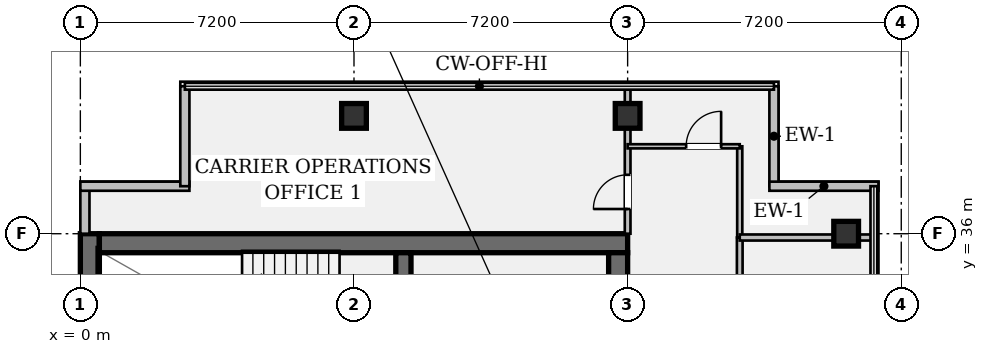
"""IFC4 building model, lengths in metres.
Left out: names, types, materials, properties, quantities, classifications, styles, units other than length and angle.
Written with IfcOpenShell. Run it as: python <this file> out.ifc"""

import sys

from ifc_helpers import new_model, si_unit, direction, frame, frame_2d, origin, origin_2d, place, context, subcontext, project, spatial, rectangle, hollow_rectangle, extrude, element, fill, save


model = new_model("IFC4")
c1 = context("Model", 3, precision=1e-05, world=origin(), true_north=direction((0.0, 1.0)))
c2 = subcontext(c1, "Body", "Model", "MODEL_VIEW")
j1 = project(units=[si_unit("LENGTHUNIT", "METRE"), si_unit("PLANEANGLEUNIT", "RADIAN")], contexts=[c1])
p1 = place(None, origin())
s1 = spatial("IfcSite", under=j1, at=p1, CompositionType="ELEMENT")
p2 = place(p1, origin())
s2 = spatial("IfcBuilding", under=s1, at=p2, CompositionType="ELEMENT")
p3 = place(p2, frame((0.0, 0.0, 272.65)))
s3 = spatial("IfcBuildingStorey", under=s2, at=p3, CompositionType="ELEMENT", Elevation=272.65)
p4 = place(p3, frame((0.25, 7.2, 0.0), z_axis=(0.0, 0.0, 1.0), x_axis=(0.0, 1.0, 0.0)))
e1 = element("IfcWall", 1, at=p4, inside=s3, PredefinedType="SHEAR", context=c2, shape_type="SweptSolid", body=[
    extrude(rectangle(XDim=28.8, YDim=0.5, at=frame_2d((14.4, 0.0))), origin(), (0.0, 0.0, 1.0), 3.24),
])
p5 = place(p3, frame((0.5, 35.75, 0.0), z_axis=(0.0, 0.0, 1.0), x_axis=(1.0, 0.0, 0.0)))
e2 = element("IfcWall", 2, at=p5, inside=s3, PredefinedType="SHEAR", context=c2, shape_type="SweptSolid", body=[
    extrude(rectangle(XDim=13.9, YDim=0.5, at=frame_2d((6.95, 0.0))), origin(), (0.0, 0.0, 1.0), 3.24),
])
p6 = place(p3, frame((14.15, 35.5, 0.0), z_axis=(0.0, 0.0, 1.0), x_axis=(0.0, -1.0, 0.0)))
e3 = element("IfcWall", 3, at=p6, inside=s3, PredefinedType="SHEAR", context=c2, shape_type="SweptSolid", body=[
    extrude(rectangle(XDim=27.8, YDim=0.5, at=frame_2d((13.9, 0.0))), origin(), (0.0, 0.0, 1.0), 3.24),
])
p7 = place(p6, frame((1.4, 0.0, 0.0)))
e4 = element("IfcOpeningElement", 4, at=p7, cuts=e3, PredefinedType="OPENING", context=c2, shape_type="SweptSolid", body=[
    extrude(rectangle(XDim=1.2, YDim=2.15, at=frame_2d((0.6, 1.075))), frame((0.0, 0.262, 0.0), z_axis=(0.0, -1.0, 0.0), x_axis=(1.0, 0.0, 0.0)), (0.0, 0.0, 1.0), 0.524),
])
p8 = place(p6, frame((25.35, 0.0, 0.0)))
e5 = element("IfcOpeningElement", 5, at=p8, cuts=e3, PredefinedType="OPENING", context=c2, shape_type="SweptSolid", body=[
    extrude(rectangle(XDim=1.2, YDim=2.15, at=frame_2d((0.6, 1.075))), frame((0.0, 0.262, 0.0), z_axis=(0.0, -1.0, 0.0), x_axis=(1.0, 0.0, 0.0)), (0.0, 0.0, 1.0), 0.524),
])
p9 = place(p6, frame((14.7, 0.0, 0.0)))
e6 = element("IfcOpeningElement", 6, at=p9, cuts=e3, PredefinedType="OPENING", context=c2, shape_type="SweptSolid", body=[
    extrude(rectangle(XDim=1.6, YDim=2.2, at=frame_2d((0.8, 1.1))), frame((0.0, 0.262, 0.0), z_axis=(0.0, -1.0, 0.0), x_axis=(1.0, 0.0, 0.0)), (0.0, 0.0, 1.0), 0.524),
])
p10 = place(p3, frame((8.5, 31.72, 0.0), z_axis=(0.0, 0.0, 1.0), x_axis=(0.0, 1.0, 0.0)))
e7 = element("IfcWall", 7, at=p10, inside=s3, PredefinedType="SHEAR", context=c2, shape_type="SweptSolid", body=[
    extrude(rectangle(XDim=3.78, YDim=0.4, at=frame_2d((1.89, 0.0))), origin(), (0.0, 0.0, 1.0), 3.24),
])
p11 = place(p10, frame((0.9, 0.0, 0.0)))
e8 = element("IfcOpeningElement", 8, at=p11, cuts=e7, PredefinedType="OPENING", context=c2, shape_type="SweptSolid", body=[
    extrude(rectangle(XDim=1.1, YDim=2.15, at=frame_2d((0.55, 1.075))), frame((0.0, 0.212, 0.0), z_axis=(0.0, -1.0, 0.0), x_axis=(1.0, 0.0, 0.0)), (0.0, 0.0, 1.0), 0.424),
])
for number, where, z_axis, x_axis in (
    (9, (7.2, 39.1, 0.0), (0.0, 0.0, 1.0), (1.0, 0.0, 0.0)),
    (10, (14.4, 39.1, 0.0), (0.0, 0.0, 1.0), (1.0, 0.0, 0.0)),
    (11, (20.15, 36.0, 0.0), (0.0, 0.0, 1.0), (1.0, 0.0, 0.0)),
):
    element("IfcColumn", number, at=place(p3, frame(where, z_axis=z_axis, x_axis=x_axis)), inside=s3, PredefinedType="COLUMN", context=c2, shape_type="SweptSolid", body=[
        extrude(hollow_rectangle(XDim=0.65, YDim=0.65, WallThickness=0.04, at=origin_2d()), origin(), (0.0, 0.0, 1.0), 3.24),
    ])
p12 = place(p3, frame((0.12, 36.0, 0.0), z_axis=(0.0, 0.0, 1.0), x_axis=(0.0, 1.0, 0.0)))
e12 = element("IfcWall", 12, at=p12, inside=s3, PredefinedType="STANDARD", context=c2, shape_type="SweptSolid", body=[
    extrude(rectangle(XDim=1.25, YDim=0.24, at=frame_2d((0.625, 0.0))), origin(), (0.0, 0.0, 1.0), 3.24),
])
p13 = place(p3, frame((0.0, 37.25, 0.0), z_axis=(0.0, 0.0, 1.0), x_axis=(1.0, 0.0, 0.0)))
e13 = element("IfcWall", 13, at=p13, inside=s3, PredefinedType="STANDARD", context=c2, shape_type="SweptSolid", body=[
    extrude(rectangle(XDim=2.87, YDim=0.24, at=frame_2d((1.435, 0.0))), origin(), (0.0, 0.0, 1.0), 3.24),
])
for number, where, z_axis, x_axis in (
    (14, (2.75, 37.25, 0.0), (0.0, 0.0, 1.0), (0.0, 1.0, 0.0)),
    (15, (18.25, 39.88, 0.0), (0.0, 0.0, 1.0), (0.0, -1.0, 0.0)),
):
    element("IfcWall", number, at=place(p3, frame(where, z_axis=z_axis, x_axis=x_axis)), inside=s3, PredefinedType="STANDARD", context=c2, shape_type="SweptSolid", body=[
        extrude(rectangle(XDim=2.63, YDim=0.24, at=frame_2d((1.315, 0.0))), origin(), (0.0, 0.0, 1.0), 3.24),
    ])
p14 = place(p3, frame((18.13, 37.25, 0.0), z_axis=(0.0, 0.0, 1.0), x_axis=(1.0, 0.0, 0.0)))
e16 = element("IfcWall", 16, at=p14, inside=s3, PredefinedType="STANDARD", context=c2, shape_type="SweptSolid", body=[
    extrude(rectangle(XDim=2.87, YDim=0.24, at=frame_2d((1.435, 0.0))), origin(), (0.0, 0.0, 1.0), 3.24),
])
p15 = place(p3, frame((17.35, 13.15, 0.0), z_axis=(0.0, 0.0, 1.0), x_axis=(0.0, 1.0, 0.0)))
e17 = element("IfcWall", 17, at=p15, inside=s3, PredefinedType="PARTITIONING", context=c2, shape_type="SweptSolid", body=[
    extrude(rectangle(XDim=22.75, YDim=0.15, at=frame_2d((11.375, 0.0))), origin(), (0.0, 0.0, 1.0), 2.676),
])
p16 = place(p15, frame((4.3, 0.0, 0.0)))
e18 = element("IfcOpeningElement", 18, at=p16, cuts=e17, PredefinedType="OPENING", context=c2, shape_type="SweptSolid", body=[
    extrude(rectangle(XDim=0.92, YDim=2.15, at=frame_2d((0.46, 1.075))), frame((0.0, 0.087, 0.0), z_axis=(0.0, -1.0, 0.0), x_axis=(1.0, 0.0, 0.0)), (0.0, 0.0, 1.0), 0.174),
])
p17 = place(p15, frame((8.4, 0.0, 0.0)))
e19 = element("IfcOpeningElement", 19, at=p17, cuts=e17, PredefinedType="OPENING", context=c2, shape_type="SweptSolid", body=[
    extrude(rectangle(XDim=1.0, YDim=2.15, at=frame_2d((0.5, 1.075))), frame((0.0, 0.087, 0.0), z_axis=(0.0, -1.0, 0.0), x_axis=(1.0, 0.0, 0.0)), (0.0, 0.0, 1.0), 0.174),
])
p18 = place(p3, frame((14.4, 36.0, 0.0), z_axis=(0.0, 0.0, 1.0), x_axis=(0.0, 1.0, 0.0)))
e20 = element("IfcWall", 20, at=p18, inside=s3, PredefinedType="PARTITIONING", context=c2, shape_type="SweptSolid", body=[
    extrude(rectangle(XDim=3.88, YDim=0.15, at=frame_2d((1.94, 0.0))), origin(), (0.0, 0.0, 1.0), 2.676),
])
p19 = place(p18, frame((0.65, 0.0, 0.0)))
e21 = element("IfcOpeningElement", 21, at=p19, cuts=e20, PredefinedType="OPENING", context=c2, shape_type="SweptSolid", body=[
    extrude(rectangle(XDim=0.9, YDim=2.15, at=frame_2d((0.45, 1.075))), frame((0.0, 0.087, 0.0), z_axis=(0.0, -1.0, 0.0), x_axis=(1.0, 0.0, 0.0)), (0.0, 0.0, 1.0), 0.174),
])
p20 = place(p3, frame((17.35, 35.9, 0.0), z_axis=(0.0, 0.0, 1.0), x_axis=(0.0, 1.0, 0.0)))
e22 = element("IfcWall", 22, at=p20, inside=s3, PredefinedType="PARTITIONING", context=c2, shape_type="SweptSolid", body=[
    extrude(rectangle(XDim=2.4, YDim=0.135, at=frame_2d((1.2, 0.0))), origin(), (0.0, 0.0, 1.0), 2.676),
])
p21 = place(p3, frame((14.4, 38.3, 0.0), z_axis=(0.0, 0.0, 1.0), x_axis=(1.0, 0.0, 0.0)))
e23 = element("IfcWall", 23, at=p21, inside=s3, PredefinedType="PARTITIONING", context=c2, shape_type="SweptSolid", body=[
    extrude(rectangle(XDim=2.95, YDim=0.11, at=frame_2d((1.475, 0.0))), origin(), (0.0, 0.0, 1.0), 3.24),
])
p22 = place(p21, frame((1.54, 0.0, 0.0)))
e24 = element("IfcOpeningElement", 24, at=p22, cuts=e23, PredefinedType="OPENING", context=c2, shape_type="SweptSolid", body=[
    extrude(rectangle(XDim=0.92, YDim=2.15, at=frame_2d((0.46, 1.075))), frame((0.0, 0.067, 0.0), z_axis=(0.0, -1.0, 0.0), x_axis=(1.0, 0.0, 0.0)), (0.0, 0.0, 1.0), 0.134),
])
p23 = place(p3, frame((17.35, 35.9, 0.0), z_axis=(0.0, 0.0, 1.0), x_axis=(1.0, 0.0, 0.0)))
e25 = element("IfcWall", 25, at=p23, inside=s3, PredefinedType="PARTITIONING", context=c2, shape_type="SweptSolid", body=[
    extrude(rectangle(XDim=3.53, YDim=0.16, at=frame_2d((1.765, 0.0))), origin(), (0.0, 0.0, 1.0), 2.676),
])
p24 = place(p19, origin())
e26 = element("IfcDoor", 26, at=p24, inside=s3, OperationType="SINGLE_SWING_LEFT", PredefinedType="DOOR", context=c2, shape_type="SweptSolid", body=[
    extrude(rectangle(XDim=0.9, YDim=2.15, at=frame_2d((0.45, 1.075))), frame((0.0, 0.025, 0.0), z_axis=(0.0, -1.0, 0.0), x_axis=(1.0, 0.0, 0.0)), (0.0, 0.0, 1.0), 0.05),
])
fill(e21, e26)
p25 = place(p22, origin())
e27 = element("IfcDoor", 27, at=p25, inside=s3, OperationType="SINGLE_SWING_RIGHT", PredefinedType="DOOR", context=c2, shape_type="SweptSolid", body=[
    extrude(rectangle(XDim=0.92, YDim=2.15, at=frame_2d((0.46, 1.075))), frame((0.0, 0.025, 0.0), z_axis=(0.0, -1.0, 0.0), x_axis=(1.0, 0.0, 0.0)), (0.0, 0.0, 1.0), 0.05),
])
fill(e24, e27)
save(model, sys.argv[1])
